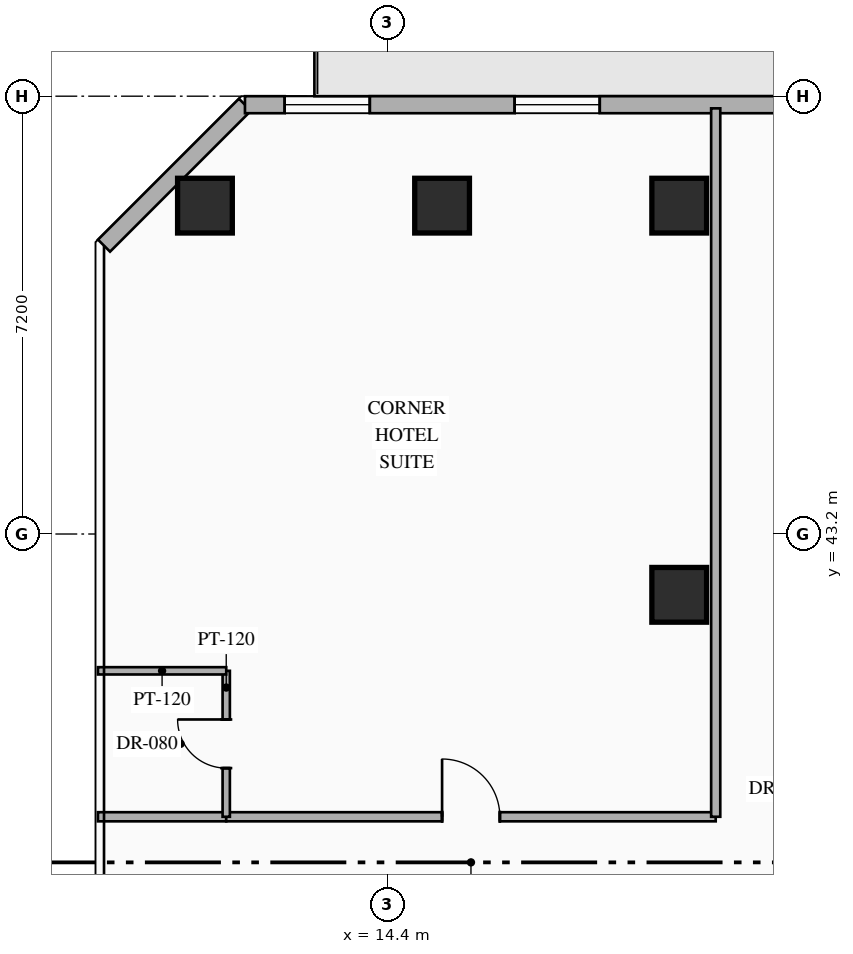
"""IFC4 building model, lengths in metres.
Left out: names, types, materials, properties, quantities, classifications, styles, units other than length and angle.
Written with IfcOpenShell. Run it as: python <this file> out.ifc"""

import sys

from ifc_helpers import new_model, si_unit, direction, frame, frame_2d, origin, origin_2d, place, context, subcontext, project, spatial, rectangle, hollow_rectangle, extrude, element, fill, save


model = new_model("IFC4")
c1 = context("Model", 3, precision=1e-05, world=origin(), true_north=direction((0.0, 1.0)))
c2 = subcontext(c1, "Body", "Model", "MODEL_VIEW")
j1 = project(units=[si_unit("LENGTHUNIT", "METRE"), si_unit("PLANEANGLEUNIT", "RADIAN")], contexts=[c1])
p1 = place(None, origin())
s1 = spatial("IfcSite", under=j1, at=p1, CompositionType="ELEMENT")
p2 = place(p1, origin())
s2 = spatial("IfcBuilding", under=s1, at=p2, CompositionType="ELEMENT")
p3 = place(p2, frame((0.0, 0.0, 77.95)))
s3 = spatial("IfcBuildingStorey", under=s2, at=p3, CompositionType="ELEMENT", Elevation=77.95)
for number, where, z_axis, x_axis in (
    (1, (11.4, 48.6, 0.0), (0.0, 0.0, 1.0), (1.0, 0.0, 0.0)),
    (2, (19.2, 48.6, 0.0), (0.0, 0.0, 1.0), (1.0, 0.0, 0.0)),
    (3, (19.2, 42.2, 0.0), (0.0, 0.0, 1.0), (1.0, 0.0, 0.0)),
    (4, (15.3, 48.6, 0.0), (0.0, 0.0, 1.0), (1.0, 0.0, 0.0)),
):
    element("IfcColumn", number, at=place(p3, frame(where, z_axis=z_axis, x_axis=x_axis)), inside=s3, PredefinedType="COLUMN", context=c2, shape_type="SweptSolid", body=[
        extrude(hollow_rectangle(XDim=0.9, YDim=0.9, WallThickness=0.036, at=origin_2d()), origin(), (0.0, 0.0, 1.0), 3.35),
    ])
p4 = place(p3, frame((9.74, 47.942, 0.0), z_axis=(0.0, 0.0, 1.0), x_axis=(0.707106781187, 0.707106781187, 0.0)))
e5 = element("IfcWall", 5, at=p4, inside=s3, PredefinedType="STANDARD", context=c2, shape_type="SweptSolid", body=[
    extrude(rectangle(XDim=3.278, YDim=0.28, at=frame_2d((1.639, 0.0))), origin(), (0.0, 0.0, 1.0), 3.13),
])
p5 = place(p3, frame((12.058, 50.26, 0.0), z_axis=(0.0, 0.0, 1.0), x_axis=(1.0, 0.0, 0.0)))
e6 = element("IfcWall", 6, at=p5, inside=s3, PredefinedType="STANDARD", context=c2, shape_type="SweptSolid", body=[
    extrude(rectangle(XDim=30.484, YDim=0.28, at=frame_2d((15.242, 0.0))), origin(), (0.0, 0.0, 1.0), 3.13),
])
p6 = place(p5, frame((14.992, 0.0, 0.0)))
e7 = element("IfcOpeningElement", 7, at=p6, cuts=e6, PredefinedType="OPENING", context=c2, shape_type="SweptSolid", body=[
    extrude(rectangle(XDim=1.1, YDim=2.2, at=frame_2d((0.55, 1.1))), frame((0.0, 0.15, 0.0), z_axis=(0.0, -1.0, 0.0), x_axis=(1.0, 0.0, 0.0)), (0.0, 0.0, 1.0), 0.3),
])
p7 = place(p5, frame((0.653, 0.0, 0.85)))
e8 = element("IfcOpeningElement", 8, at=p7, cuts=e6, PredefinedType="OPENING", context=c2, shape_type="SweptSolid", body=[
    extrude(rectangle(XDim=1.4, YDim=1.8, at=frame_2d((0.7, 0.9))), frame((0.0, 0.15, 0.0), z_axis=(0.0, -1.0, 0.0), x_axis=(1.0, 0.0, 0.0)), (0.0, 0.0, 1.0), 0.3),
])
p8 = place(p5, frame((4.435, 0.0, 0.85)))
e9 = element("IfcOpeningElement", 9, at=p8, cuts=e6, PredefinedType="OPENING", context=c2, shape_type="SweptSolid", body=[
    extrude(rectangle(XDim=1.4, YDim=1.8, at=frame_2d((0.7, 0.9))), frame((0.0, 0.15, 0.0), z_axis=(0.0, -1.0, 0.0), x_axis=(1.0, 0.0, 0.0)), (0.0, 0.0, 1.0), 0.3),
])
p9 = place(p5, frame((11.361, 0.0, 0.85)))
e10 = element("IfcOpeningElement", 10, at=p9, cuts=e6, PredefinedType="OPENING", context=c2, shape_type="SweptSolid", body=[
    extrude(rectangle(XDim=1.4, YDim=1.8, at=frame_2d((0.7, 0.9))), frame((0.0, 0.15, 0.0), z_axis=(0.0, -1.0, 0.0), x_axis=(1.0, 0.0, 0.0)), (0.0, 0.0, 1.0), 0.3),
])
p10 = place(p5, frame((19.693, 0.0, 0.85)))
e11 = element("IfcOpeningElement", 11, at=p10, cuts=e6, PredefinedType="OPENING", context=c2, shape_type="SweptSolid", body=[
    extrude(rectangle(XDim=1.4, YDim=1.8, at=frame_2d((0.7, 0.9))), frame((0.0, 0.15, 0.0), z_axis=(0.0, -1.0, 0.0), x_axis=(1.0, 0.0, 0.0)), (0.0, 0.0, 1.0), 0.3),
])
p11 = place(p5, frame((23.252, 0.0, 0.85)))
e12 = element("IfcOpeningElement", 12, at=p11, cuts=e6, PredefinedType="OPENING", context=c2, shape_type="SweptSolid", body=[
    extrude(rectangle(XDim=1.4, YDim=1.8, at=frame_2d((0.7, 0.9))), frame((0.0, 0.15, 0.0), z_axis=(0.0, -1.0, 0.0), x_axis=(1.0, 0.0, 0.0)), (0.0, 0.0, 1.0), 0.3),
])
p12 = place(p5, frame((27.417, 0.0, 0.85)))
e13 = element("IfcOpeningElement", 13, at=p12, cuts=e6, PredefinedType="OPENING", context=c2, shape_type="SweptSolid", body=[
    extrude(rectangle(XDim=1.4, YDim=1.8, at=frame_2d((0.7, 0.9))), frame((0.0, 0.15, 0.0), z_axis=(0.0, -1.0, 0.0), x_axis=(1.0, 0.0, 0.0)), (0.0, 0.0, 1.0), 0.3),
])
p13 = place(p3, frame((9.64, 38.55, 0.0), z_axis=(0.0, 0.0, 1.0), x_axis=(1.0, 0.0, 0.0)))
e14 = element("IfcWall", 14, at=p13, inside=s3, PredefinedType="PARTITIONING", context=c2, shape_type="SweptSolid", body=[
    extrude(rectangle(XDim=2.11, YDim=0.15, at=frame_2d((1.055, 0.0))), origin(), (0.0, 0.0, 1.0), 2.775),
])
p14 = place(p3, frame((11.75, 38.55, 0.0), z_axis=(0.0, 0.0, 1.0), x_axis=(1.0, 0.0, 0.0)))
e15 = element("IfcWall", 15, at=p14, inside=s3, PredefinedType="PARTITIONING", context=c2, shape_type="SweptSolid", body=[
    extrude(rectangle(XDim=8.05, YDim=0.15, at=frame_2d((4.025, 0.0))), origin(), (0.0, 0.0, 1.0), 2.775),
])
p15 = place(p14, frame((3.55, 0.0, 0.0)))
e16 = element("IfcOpeningElement", 16, at=p15, cuts=e15, PredefinedType="OPENING", context=c2, shape_type="SweptSolid", body=[
    extrude(rectangle(XDim=0.95, YDim=2.15, at=frame_2d((0.475, 1.075))), frame((0.0, 0.085, 0.0), z_axis=(0.0, -1.0, 0.0), x_axis=(1.0, 0.0, 0.0)), (0.0, 0.0, 1.0), 0.17),
])
p16 = place(p3, frame((11.75, 38.55, 0.0), z_axis=(0.0, 0.0, 1.0), x_axis=(0.0, 1.0, 0.0)))
e17 = element("IfcWall", 17, at=p16, inside=s3, PredefinedType="PARTITIONING", context=c2, shape_type="SweptSolid", body=[
    extrude(rectangle(XDim=2.4, YDim=0.12, at=frame_2d((1.2, 0.0))), origin(), (0.0, 0.0, 1.0), 3.13),
])
p17 = place(p16, frame((0.8, 0.0, 0.0)))
e18 = element("IfcOpeningElement", 18, at=p17, cuts=e17, PredefinedType="OPENING", context=c2, shape_type="SweptSolid", body=[
    extrude(rectangle(XDim=0.8, YDim=2.06, at=frame_2d((0.4, 1.03))), frame((0.0, 0.07, 0.0), z_axis=(0.0, -1.0, 0.0), x_axis=(1.0, 0.0, 0.0)), (0.0, 0.0, 1.0), 0.14),
])
p18 = place(p3, frame((9.64, 40.95, 0.0), z_axis=(0.0, 0.0, 1.0), x_axis=(1.0, 0.0, 0.0)))
e19 = element("IfcWall", 19, at=p18, inside=s3, PredefinedType="PARTITIONING", context=c2, shape_type="SweptSolid", body=[
    extrude(rectangle(XDim=2.11, YDim=0.12, at=frame_2d((1.055, 0.0))), origin(), (0.0, 0.0, 1.0), 2.775),
])
p19 = place(p3, frame((19.8, 38.55, 0.0), z_axis=(0.0, 0.0, 1.0), x_axis=(0.0, 1.0, 0.0)))
e20 = element("IfcWall", 20, at=p19, inside=s3, PredefinedType="PARTITIONING", context=c2, shape_type="SweptSolid", body=[
    extrude(rectangle(XDim=11.65, YDim=0.15, at=frame_2d((5.825, 0.0))), origin(), (0.0, 0.0, 1.0), 3.13),
])
p20 = place(p7, origin())
e21 = element("IfcWindow", 21, at=p20, inside=s3, PartitioningType="SINGLE_PANEL", PredefinedType="WINDOW", context=c2, shape_type="SweptSolid", body=[
    extrude(rectangle(XDim=1.4, YDim=1.8, at=frame_2d((0.7, 0.9))), frame((0.0, 0.03, 0.0), z_axis=(0.0, -1.0, 0.0), x_axis=(1.0, 0.0, 0.0)), (0.0, 0.0, 1.0), 0.06),
])
fill(e8, e21)
p21 = place(p8, origin())
e22 = element("IfcWindow", 22, at=p21, inside=s3, PartitioningType="SINGLE_PANEL", PredefinedType="WINDOW", context=c2, shape_type="SweptSolid", body=[
    extrude(rectangle(XDim=1.4, YDim=1.8, at=frame_2d((0.7, 0.9))), frame((0.0, 0.03, 0.0), z_axis=(0.0, -1.0, 0.0), x_axis=(1.0, 0.0, 0.0)), (0.0, 0.0, 1.0), 0.06),
])
fill(e9, e22)
p22 = place(p15, origin())
e23 = element("IfcDoor", 23, at=p22, inside=s3, OperationType="SINGLE_SWING_LEFT", PredefinedType="DOOR", context=c2, shape_type="SweptSolid", body=[
    extrude(rectangle(XDim=0.95, YDim=2.15, at=frame_2d((0.475, 1.075))), frame((0.0, 0.025, 0.0), z_axis=(0.0, -1.0, 0.0), x_axis=(1.0, 0.0, 0.0)), (0.0, 0.0, 1.0), 0.05),
])
fill(e16, e23)
p23 = place(p17, origin())
e24 = element("IfcDoor", 24, at=p23, inside=s3, OperationType="SINGLE_SWING_RIGHT", PredefinedType="DOOR", context=c2, shape_type="SweptSolid", body=[
    extrude(rectangle(XDim=0.8, YDim=2.06, at=frame_2d((0.4, 1.03))), frame((0.0, 0.025, 0.0), z_axis=(0.0, -1.0, 0.0), x_axis=(1.0, 0.0, 0.0)), (0.0, 0.0, 1.0), 0.05),
])
fill(e18, e24)
save(model, sys.argv[1])
